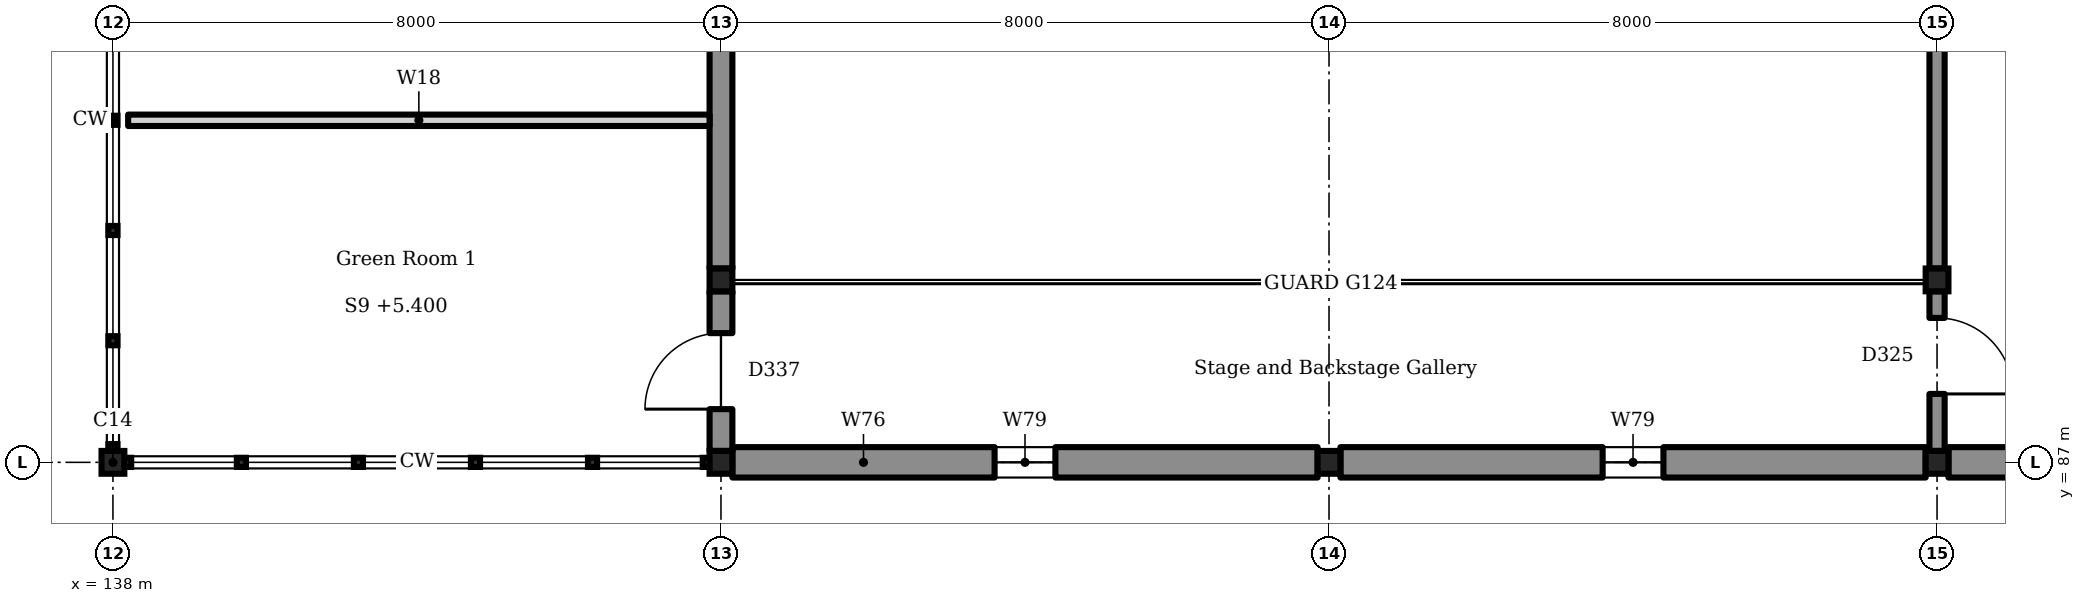
"""IFC4 building model, lengths in metres.
Left out: names, types, materials, properties, quantities, classifications, styles, units other than length and angle.
Written with IfcOpenShell. Run it as: python <this file> out.ifc"""

import sys

from ifc_helpers import new_model, si_unit, direction, frame, frame_2d, origin, origin_2d, place, context, subcontext, project, spatial, rectangle, i_section, extrude, element, fill, save


model = new_model("IFC4")
c1 = context("Model", 3, precision=1e-05, world=origin(), true_north=direction((0.0, 1.0)))
c2 = subcontext(c1, "Body", "Model", "MODEL_VIEW")
j1 = project(units=[si_unit("LENGTHUNIT", "METRE"), si_unit("PLANEANGLEUNIT", "RADIAN")], contexts=[c1])
p1 = place(None, origin())
s1 = spatial("IfcSite", under=j1, at=p1, CompositionType="ELEMENT")
p2 = place(p1, origin())
s2 = spatial("IfcBuilding", under=s1, at=p2, CompositionType="ELEMENT")
p3 = place(p2, frame((0.0, 0.0, 5.4)))
s3 = spatial("IfcBuildingStorey", under=s2, at=p3, CompositionType="ELEMENT", Elevation=5.4)
for number, where, z_axis, x_axis in (
    (1, (138.0, 87.0, 0.0), (0.0, 0.0, 1.0), (1.0, 0.0, 0.0)),
    (2, (146.0, 87.0, 0.0), (0.0, 0.0, 1.0), (1.0, 0.0, 0.0)),
    (3, (146.0, 89.4, 0.0), (0.0, 0.0, 1.0), (1.0, 0.0, 0.0)),
    (4, (162.0, 87.0, 0.0), (0.0, 0.0, 1.0), (1.0, 0.0, 0.0)),
    (5, (162.0, 89.4, 0.0), (0.0, 0.0, 1.0), (1.0, 0.0, 0.0)),
    (6, (154.0, 87.0, 0.0), (0.0, 0.0, 1.0), (1.0, 0.0, 0.0)),
):
    element("IfcColumn", number, at=place(p3, frame(where, z_axis=z_axis, x_axis=x_axis)), inside=s3, PredefinedType="COLUMN", context=c2, shape_type="SweptSolid", body=[
        extrude(i_section(OverallWidth=0.3, OverallDepth=0.3, WebThickness=0.011, FlangeThickness=0.019, FilletRadius=0.027, at=origin_2d()), origin(), (0.0, 0.0, 1.0), 4.5),
    ])
p4 = place(p3, frame((146.15, 87.0, 0.0), z_axis=(0.0, 0.0, 1.0), x_axis=(1.0, 0.0, 0.0)))
e7 = element("IfcWall", 7, at=p4, inside=s3, PredefinedType="SOLIDWALL", context=c2, shape_type="SweptSolid", body=[
    extrude(rectangle(XDim=7.7, YDim=0.4, at=frame_2d((3.85, 0.0))), origin(), (0.0, 0.0, 1.0), 4.25),
])
p5 = place(p4, frame((3.45, 0.0, 0.9)))
e8 = element("IfcOpeningElement", 8, at=p5, cuts=e7, PredefinedType="OPENING", context=c2, shape_type="SweptSolid", body=[
    extrude(rectangle(XDim=0.8, YDim=2.6, at=frame_2d((0.4, 1.3))), frame((0.0, 0.21, 0.0), z_axis=(0.0, -1.0, 0.0), x_axis=(1.0, 0.0, 0.0)), (0.0, 0.0, 1.0), 0.42),
])
p6 = place(p3, frame((154.15, 87.0, 0.0), z_axis=(0.0, 0.0, 1.0), x_axis=(1.0, 0.0, 0.0)))
e9 = element("IfcWall", 9, at=p6, inside=s3, PredefinedType="SOLIDWALL", context=c2, shape_type="SweptSolid", body=[
    extrude(rectangle(XDim=7.7, YDim=0.4, at=frame_2d((3.85, 0.0))), origin(), (0.0, 0.0, 1.0), 4.25),
])
p7 = place(p6, frame((3.45, 0.0, 0.9)))
e10 = element("IfcOpeningElement", 10, at=p7, cuts=e9, PredefinedType="OPENING", context=c2, shape_type="SweptSolid", body=[
    extrude(rectangle(XDim=0.8, YDim=2.6, at=frame_2d((0.4, 1.3))), frame((0.0, 0.21, 0.0), z_axis=(0.0, -1.0, 0.0), x_axis=(1.0, 0.0, 0.0)), (0.0, 0.0, 1.0), 0.42),
])
p8 = place(p3, frame((162.15, 87.0, 0.0), z_axis=(0.0, 0.0, 1.0), x_axis=(1.0, 0.0, 0.0)))
e11 = element("IfcWall", 11, at=p8, inside=s3, PredefinedType="SOLIDWALL", context=c2, shape_type="SweptSolid", body=[
    extrude(rectangle(XDim=7.7, YDim=0.4, at=frame_2d((3.85, 0.0))), origin(), (0.0, 0.0, 1.0), 4.25),
])
p9 = place(p8, frame((1.75, 0.0, 0.9)))
e12 = element("IfcOpeningElement", 12, at=p9, cuts=e11, PredefinedType="OPENING", context=c2, shape_type="SweptSolid", body=[
    extrude(rectangle(XDim=0.8, YDim=2.6, at=frame_2d((0.4, 1.3))), frame((0.0, 0.21, 0.0), z_axis=(0.0, -1.0, 0.0), x_axis=(1.0, 0.0, 0.0)), (0.0, 0.0, 1.0), 0.42),
])
p10 = place(p3, frame((146.0, 87.15, 0.0), z_axis=(0.0, 0.0, 1.0), x_axis=(0.0, 1.0, 0.0)))
e13 = element("IfcWall", 13, at=p10, inside=s3, PredefinedType="SOLIDWALL", context=c2, shape_type="SweptSolid", body=[
    extrude(rectangle(XDim=2.1, YDim=0.3, at=frame_2d((1.05, 0.0))), origin(), (0.0, 0.0, 1.0), 4.25),
])
p11 = place(p10, frame((0.55, 0.0, 0.0)))
e14 = element("IfcOpeningElement", 14, at=p11, cuts=e13, PredefinedType="OPENING", context=c2, shape_type="SweptSolid", body=[
    extrude(rectangle(XDim=1.0, YDim=2.1, at=frame_2d((0.5, 1.05))), frame((0.0, 0.16, 0.0), z_axis=(0.0, -1.0, 0.0), x_axis=(1.0, 0.0, 0.0)), (0.0, 0.0, 1.0), 0.32),
])
p12 = place(p3, frame((146.0, 89.55, 0.0), z_axis=(0.0, 0.0, 1.0), x_axis=(0.0, 1.0, 0.0)))
e15 = element("IfcWall", 15, at=p12, inside=s3, PredefinedType="SOLIDWALL", context=c2, shape_type="SweptSolid", body=[
    extrude(rectangle(XDim=6.3, YDim=0.3, at=frame_2d((3.15, 0.0))), origin(), (0.0, 0.0, 1.0), 4.25),
])
p13 = place(p3, frame((162.0, 87.15, 0.0), z_axis=(0.0, 0.0, 1.0), x_axis=(0.0, 1.0, 0.0)))
e16 = element("IfcWall", 16, at=p13, inside=s3, PredefinedType="SOLIDWALL", context=c2, shape_type="SweptSolid", body=[
    extrude(rectangle(XDim=2.1, YDim=0.2, at=frame_2d((1.05, 0.0))), origin(), (0.0, 0.0, 1.0), 4.25),
])
p14 = place(p13, frame((0.75, 0.0, 0.0)))
e17 = element("IfcOpeningElement", 17, at=p14, cuts=e16, PredefinedType="OPENING", context=c2, shape_type="SweptSolid", body=[
    extrude(rectangle(XDim=1.0, YDim=2.1, at=frame_2d((0.5, 1.05))), frame((0.0, 0.11, 0.0), z_axis=(0.0, -1.0, 0.0), x_axis=(1.0, 0.0, 0.0)), (0.0, 0.0, 1.0), 0.22),
])
p15 = place(p3, frame((162.0, 89.55, 0.0), z_axis=(0.0, 0.0, 1.0), x_axis=(0.0, 1.0, 0.0)))
e18 = element("IfcWall", 18, at=p15, inside=s3, PredefinedType="SOLIDWALL", context=c2, shape_type="SweptSolid", body=[
    extrude(rectangle(XDim=6.3, YDim=0.2, at=frame_2d((3.15, 0.0))), origin(), (0.0, 0.0, 1.0), 4.25),
])
p16 = place(p3, frame((138.2, 91.5, 0.0), z_axis=(0.0, 0.0, 1.0), x_axis=(1.0, 0.0, 0.0)))
e19 = element("IfcWall", 19, at=p16, inside=s3, PredefinedType="PARTITIONING", context=c2, shape_type="SweptSolid", body=[
    extrude(rectangle(XDim=7.65, YDim=0.15, at=frame_2d((3.825, 0.0))), origin(), (0.0, 0.0, 1.0), 4.25),
])
p17 = place(p5, origin())
e20 = element("IfcWindow", 20, at=p17, inside=s3, PartitioningType="SINGLE_PANEL", PredefinedType="WINDOW", context=c2, shape_type="SweptSolid", body=[
    extrude(rectangle(XDim=0.8, YDim=2.6, at=frame_2d((0.4, 1.3))), frame((0.0, 0.03, 0.0), z_axis=(0.0, -1.0, 0.0), x_axis=(1.0, 0.0, 0.0)), (0.0, 0.0, 1.0), 0.06),
])
fill(e8, e20)
p18 = place(p7, origin())
e21 = element("IfcWindow", 21, at=p18, inside=s3, PartitioningType="SINGLE_PANEL", PredefinedType="WINDOW", context=c2, shape_type="SweptSolid", body=[
    extrude(rectangle(XDim=0.8, YDim=2.6, at=frame_2d((0.4, 1.3))), frame((0.0, 0.03, 0.0), z_axis=(0.0, -1.0, 0.0), x_axis=(1.0, 0.0, 0.0)), (0.0, 0.0, 1.0), 0.06),
])
fill(e10, e21)
p19 = place(p14, frame((1.0, 0.0, 0.0), z_axis=(0.0, 0.0, 1.0), x_axis=(-1.0, 0.0, 0.0)))
e22 = element("IfcDoor", 22, at=p19, inside=s3, OperationType="SINGLE_SWING_LEFT", PredefinedType="DOOR", context=c2, shape_type="SweptSolid", body=[
    extrude(rectangle(XDim=1.0, YDim=2.1, at=frame_2d((0.5, 1.05))), frame((0.0, 0.025, 0.0), z_axis=(0.0, -1.0, 0.0), x_axis=(1.0, 0.0, 0.0)), (0.0, 0.0, 1.0), 0.05),
])
fill(e17, e22)
p20 = place(p11, origin())
e23 = element("IfcDoor", 23, at=p20, inside=s3, OperationType="SINGLE_SWING_RIGHT", PredefinedType="DOOR", context=c2, shape_type="SweptSolid", body=[
    extrude(rectangle(XDim=1.0, YDim=2.1, at=frame_2d((0.5, 1.05))), frame((0.0, 0.025, 0.0), z_axis=(0.0, -1.0, 0.0), x_axis=(1.0, 0.0, 0.0)), (0.0, 0.0, 1.0), 0.05),
])
fill(e14, e23)
save(model, sys.argv[1])
